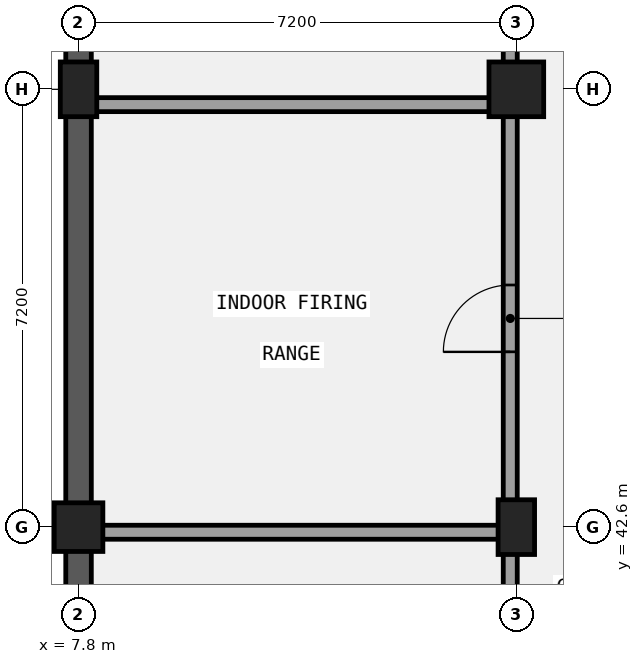
"""IFC4 building model, lengths in metres.
Left out: names, types, materials, properties, quantities, classifications, styles, units other than length and angle.
Written with IfcOpenShell. Run it as: python <this file> out.ifc"""

import sys

from ifc_helpers import new_model, si_unit, direction, frame, frame_2d, origin, origin_2d, place, context, subcontext, project, spatial, rectangle, extrude, element, fill, save


model = new_model("IFC4")
c1 = context("Model", 3, precision=1e-05, world=origin(), true_north=direction((0.0, 1.0)))
c2 = subcontext(c1, "Body", "Model", "MODEL_VIEW")
j1 = project(units=[si_unit("LENGTHUNIT", "METRE"), si_unit("PLANEANGLEUNIT", "RADIAN")], contexts=[c1])
p1 = place(None, origin())
s1 = spatial("IfcSite", under=j1, at=p1, CompositionType="ELEMENT")
p2 = place(p1, origin())
s2 = spatial("IfcBuilding", under=s1, at=p2, CompositionType="ELEMENT")
p3 = place(p2, frame((0.0, 0.0, -4.2)))
s3 = spatial("IfcBuildingStorey", under=s2, at=p3, CompositionType="ELEMENT", Elevation=-4.2)
p4 = place(p3, frame((7.8, 21.2, 0.0), z_axis=(0.0, 0.0, 1.0), x_axis=(0.0, 1.0, 0.0)))
e1 = element("IfcWall", 1, at=p4, inside=s3, PredefinedType="USERDEFINED", context=c2, shape_type="SweptSolid", body=[
    extrude(rectangle(XDim=35.6, YDim=0.42, at=frame_2d((17.8, 0.0))), origin(), (0.0, 0.0, 1.0), 2.88),
])
p5 = place(p3, frame((7.8, 42.6, 0.0), z_axis=(0.0, 0.0, 1.0), x_axis=(1.0, 0.0, 0.0)))
e2 = element("IfcColumn", 2, at=p5, inside=s3, PredefinedType="COLUMN", context=c2, shape_type="SweptSolid", body=[
    extrude(rectangle(XDim=0.8, YDim=0.8, at=origin_2d()), origin(), (0.0, 0.0, 1.0), 4.2),
])
for number, where, z_axis, x_axis in (
    (3, (7.8, 49.8, 0.0), (0.0, 0.0, 1.0), (1.0, 0.0, 0.0)),
    (4, (15.0, 42.6, 0.0), (0.0, 0.0, 1.0), (1.0, 0.0, 0.0)),
):
    element("IfcColumn", number, at=place(p3, frame(where, z_axis=z_axis, x_axis=x_axis)), inside=s3, PredefinedType="COLUMN", context=c2, shape_type="SweptSolid", body=[
        extrude(rectangle(XDim=0.6, YDim=0.9, at=origin_2d()), origin(), (0.0, 0.0, 1.0), 4.2),
    ])
p6 = place(p3, frame((15.0, 49.8, 0.0), z_axis=(0.0, 0.0, 1.0), x_axis=(1.0, 0.0, 0.0)))
e5 = element("IfcColumn", 5, at=p6, inside=s3, PredefinedType="COLUMN", context=c2, shape_type="SweptSolid", body=[
    extrude(rectangle(XDim=0.9, YDim=0.9, at=origin_2d()), origin(), (0.0, 0.0, 1.0), 4.2),
])
p7 = place(p3, frame((14.9, 35.484, 0.0), z_axis=(0.0, 0.0, 1.0), x_axis=(0.0, 1.0, 0.0)))
e6 = element("IfcWall", 6, at=p7, inside=s3, PredefinedType="PARTITIONING", context=c2, shape_type="SweptSolid", body=[
    extrude(rectangle(XDim=7.032, YDim=0.23, at=frame_2d((3.516, 0.0))), origin(), (0.0, 0.0, 1.0), 3.23),
])
p8 = place(p7, frame((2.996, 0.0, 0.0)))
e7 = element("IfcOpeningElement", 7, at=p8, cuts=e6, PredefinedType="OPENING", context=c2, shape_type="SweptSolid", body=[
    extrude(rectangle(XDim=1.04, YDim=2.35, at=frame_2d((0.52, 1.175))), frame((0.0, 0.125, 0.0), z_axis=(0.0, -1.0, 0.0), x_axis=(1.0, 0.0, 0.0)), (0.0, 0.0, 1.0), 0.25),
])
p9 = place(p3, frame((7.98, 42.516, 0.0), z_axis=(0.0, 0.0, 1.0), x_axis=(1.0, 0.0, 0.0)))
e8 = element("IfcWall", 8, at=p9, inside=s3, PredefinedType="PARTITIONING", context=c2, shape_type="SweptSolid", body=[
    extrude(rectangle(XDim=6.92, YDim=0.23, at=frame_2d((3.46, 0.0))), origin(), (0.0, 0.0, 1.0), 2.88),
])
p10 = place(p3, frame((14.9, 42.516, 0.0), z_axis=(0.0, 0.0, 1.0), x_axis=(0.0, 1.0, 0.0)))
e9 = element("IfcWall", 9, at=p10, inside=s3, PredefinedType="PARTITIONING", context=c2, shape_type="SweptSolid", body=[
    extrude(rectangle(XDim=7.032, YDim=0.23, at=frame_2d((3.516, 0.0))), origin(), (0.0, 0.0, 1.0), 3.13),
])
p11 = place(p10, frame((2.966, 0.0, 0.0)))
e10 = element("IfcOpeningElement", 10, at=p11, cuts=e9, PredefinedType="OPENING", context=c2, shape_type="SweptSolid", body=[
    extrude(rectangle(XDim=1.1, YDim=2.1, at=frame_2d((0.55, 1.05))), frame((0.0, 0.125, 0.0), z_axis=(0.0, -1.0, 0.0), x_axis=(1.0, 0.0, 0.0)), (0.0, 0.0, 1.0), 0.25),
])
p12 = place(p3, frame((7.98, 49.548, 0.0), z_axis=(0.0, 0.0, 1.0), x_axis=(1.0, 0.0, 0.0)))
e11 = element("IfcWall", 11, at=p12, inside=s3, PredefinedType="PARTITIONING", context=c2, shape_type="SweptSolid", body=[
    extrude(rectangle(XDim=6.92, YDim=0.23, at=frame_2d((3.46, 0.0))), origin(), (0.0, 0.0, 1.0), 3.33),
])
p13 = place(p3, frame((14.9, 49.548, 0.0), z_axis=(0.0, 0.0, 1.0), x_axis=(0.0, 1.0, 0.0)))
e12 = element("IfcWall", 12, at=p13, inside=s3, PredefinedType="PARTITIONING", context=c2, shape_type="SweptSolid", body=[
    extrude(rectangle(XDim=7.032, YDim=0.23, at=frame_2d((3.516, 0.0))), origin(), (0.0, 0.0, 1.0), 3.13),
])
p14 = place(p13, frame((2.966, 0.0, 0.0)))
e13 = element("IfcOpeningElement", 13, at=p14, cuts=e12, PredefinedType="OPENING", context=c2, shape_type="SweptSolid", body=[
    extrude(rectangle(XDim=1.1, YDim=2.22, at=frame_2d((0.55, 1.11))), frame((0.0, 0.125, 0.0), z_axis=(0.0, -1.0, 0.0), x_axis=(1.0, 0.0, 0.0)), (0.0, 0.0, 1.0), 0.25),
])
p15 = place(p11, frame((1.1, 0.0, 0.0), z_axis=(0.0, 0.0, 1.0), x_axis=(-1.0, 0.0, 0.0)))
e14 = element("IfcDoor", 14, at=p15, inside=s3, OperationType="SINGLE_SWING_LEFT", PredefinedType="DOOR", context=c2, shape_type="SweptSolid", body=[
    extrude(rectangle(XDim=1.1, YDim=2.1, at=frame_2d((0.55, 1.05))), frame((0.0, 0.025, 0.0), z_axis=(0.0, -1.0, 0.0), x_axis=(1.0, 0.0, 0.0)), (0.0, 0.0, 1.0), 0.05),
])
fill(e10, e14)
save(model, sys.argv[1])
